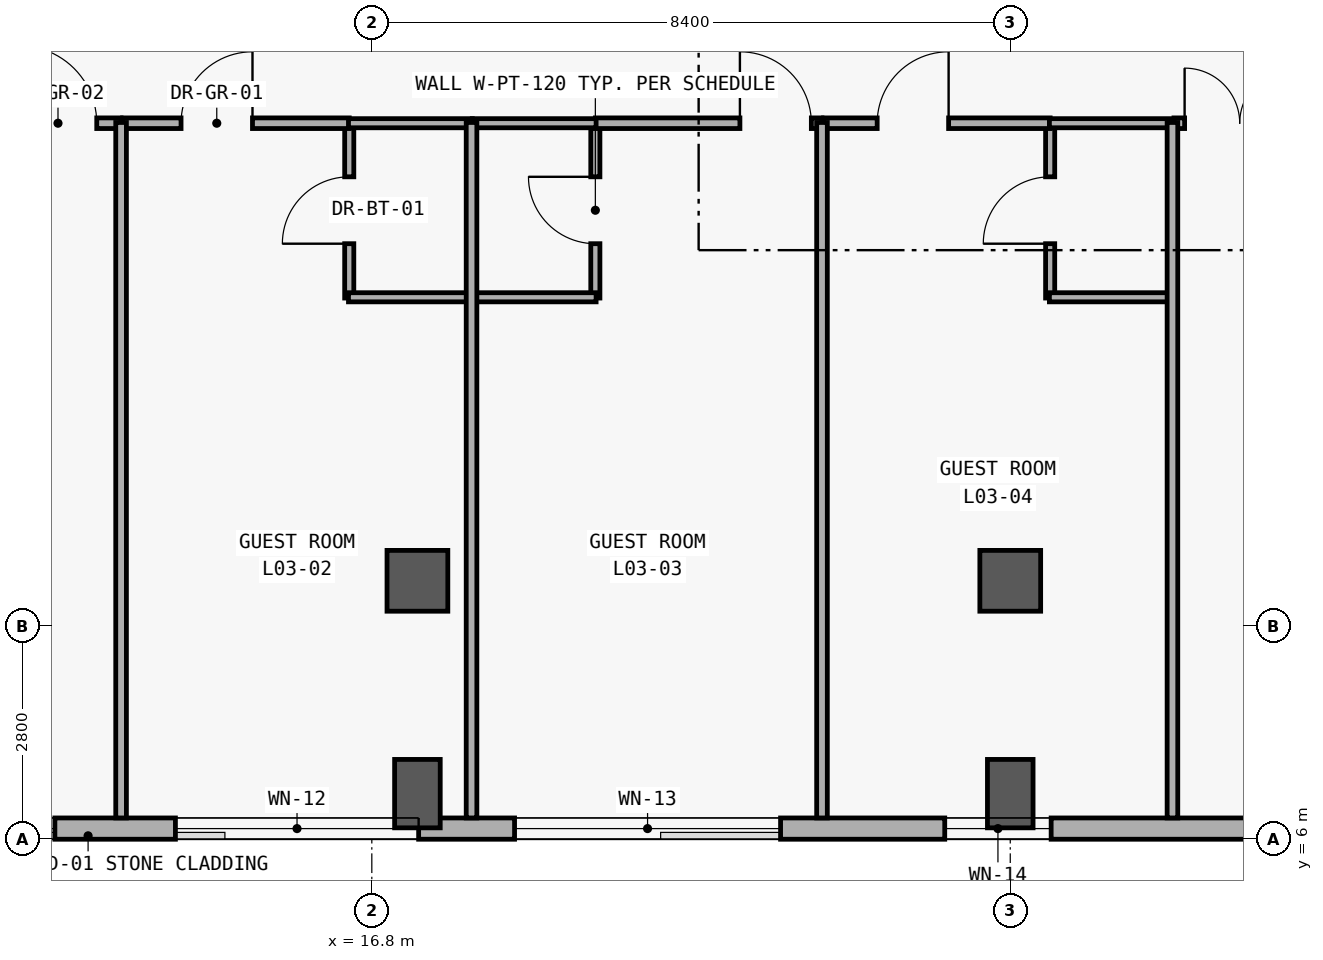
"""IFC4 building model, lengths in metres.
Left out: names, types, materials, properties, quantities, classifications, styles, units other than length and angle.
Written with IfcOpenShell. Run it as: python <this file> out.ifc"""

import sys

from ifc_helpers import new_model, si_unit, direction, frame, frame_2d, origin, origin_2d, place, context, subcontext, project, spatial, rectangle, extrude, element, fill, save


model = new_model("IFC4")
c1 = context("Model", 3, precision=1e-05, world=origin(), true_north=direction((0.0, 1.0)))
c2 = subcontext(c1, "Body", "Model", "MODEL_VIEW")
j1 = project(units=[si_unit("LENGTHUNIT", "METRE"), si_unit("PLANEANGLEUNIT", "RADIAN")], contexts=[c1])
p1 = place(None, origin())
s1 = spatial("IfcSite", under=j1, at=p1, CompositionType="ELEMENT")
p2 = place(p1, origin())
s2 = spatial("IfcBuilding", under=s1, at=p2, CompositionType="ELEMENT")
p3 = place(p2, frame((0.0, 0.0, 15.0)))
s3 = spatial("IfcBuildingStorey", under=s2, at=p3, CompositionType="ELEMENT", Elevation=15.0)
p4 = place(p3, frame((17.4, 6.6, 0.0), z_axis=(0.0, 0.0, 1.0), x_axis=(0.0, 1.0, 0.0)))
e1 = element("IfcColumn", 1, at=p4, inside=s3, PredefinedType="COLUMN", context=c2, shape_type="SweptSolid", body=[
    extrude(rectangle(XDim=0.6, YDim=0.9, at=origin_2d()), origin(), (0.0, 0.0, 1.0), 4.2),
])
p5 = place(p3, frame((17.4, 9.4, 0.0), z_axis=(0.0, 0.0, 1.0), x_axis=(1.0, 0.0, 0.0)))
e2 = element("IfcColumn", 2, at=p5, inside=s3, PredefinedType="COLUMN", context=c2, shape_type="SweptSolid", body=[
    extrude(rectangle(XDim=0.8, YDim=0.8, at=origin_2d()), origin(), (0.0, 0.0, 1.0), 4.2),
])
p6 = place(p3, frame((25.2, 6.6, 0.0), z_axis=(0.0, 0.0, 1.0), x_axis=(0.0, 1.0, 0.0)))
e3 = element("IfcColumn", 3, at=p6, inside=s3, PredefinedType="COLUMN", context=c2, shape_type="SweptSolid", body=[
    extrude(rectangle(XDim=0.6, YDim=0.9, at=origin_2d()), origin(), (0.0, 0.0, 1.0), 4.2),
])
p7 = place(p3, frame((25.2, 9.4, 0.0), z_axis=(0.0, 0.0, 1.0), x_axis=(1.0, 0.0, 0.0)))
e4 = element("IfcColumn", 4, at=p7, inside=s3, PredefinedType="COLUMN", context=c2, shape_type="SweptSolid", body=[
    extrude(rectangle(XDim=0.8, YDim=0.8, at=origin_2d()), origin(), (0.0, 0.0, 1.0), 4.2),
])
p8 = place(p3, frame((92.12, 6.14, 0.0), z_axis=(0.0, 0.0, 1.0), x_axis=(-1.0, 0.0, 0.0)))
e5 = element("IfcWall", 5, at=p8, inside=s3, PredefinedType="SOLIDWALL", context=c2, shape_type="SweptSolid", body=[
    extrude(rectangle(XDim=83.44, YDim=0.28, at=frame_2d((41.72, 0.0))), origin(), (0.0, 0.0, 1.0), 3.92),
])
p9 = place(p8, frame((79.49, 0.0, 0.85)))
e6 = element("IfcOpeningElement", 6, at=p9, cuts=e5, PredefinedType="OPENING", context=c2, shape_type="SweptSolid", body=[
    extrude(rectangle(XDim=2.85, YDim=1.85, at=frame_2d((1.425, 0.925))), frame((0.0, 0.15, 0.0), z_axis=(0.0, -1.0, 0.0), x_axis=(1.0, 0.0, 0.0)), (0.0, 0.0, 1.0), 0.3),
])
p10 = place(p8, frame((74.704, 0.0, 0.85)))
e7 = element("IfcOpeningElement", 7, at=p10, cuts=e5, PredefinedType="OPENING", context=c2, shape_type="SweptSolid", body=[
    extrude(rectangle(XDim=3.2, YDim=1.95, at=frame_2d((1.6, 0.975))), frame((0.0, 0.15, 0.0), z_axis=(0.0, -1.0, 0.0), x_axis=(1.0, 0.0, 0.0)), (0.0, 0.0, 1.0), 0.3),
])
p11 = place(p8, frame((69.942, 0.0, 0.85)))
e8 = element("IfcOpeningElement", 8, at=p11, cuts=e5, PredefinedType="OPENING", context=c2, shape_type="SweptSolid", body=[
    extrude(rectangle(XDim=3.5, YDim=2.0, at=frame_2d((1.75, 1.0))), frame((0.0, 0.15, 0.0), z_axis=(0.0, -1.0, 0.0), x_axis=(1.0, 0.0, 0.0)), (0.0, 0.0, 1.0), 0.3),
])
p12 = place(p8, frame((66.382, 0.0, 0.85)))
e9 = element("IfcOpeningElement", 9, at=p12, cuts=e5, PredefinedType="OPENING", context=c2, shape_type="SweptSolid", body=[
    extrude(rectangle(XDim=1.4, YDim=1.6, at=frame_2d((0.7, 0.8))), frame((0.0, 0.15, 0.0), z_axis=(0.0, -1.0, 0.0), x_axis=(1.0, 0.0, 0.0)), (0.0, 0.0, 1.0), 0.3),
])
p13 = place(p8, frame((61.67, 0.0, 0.85)))
e10 = element("IfcOpeningElement", 10, at=p13, cuts=e5, PredefinedType="OPENING", context=c2, shape_type="SweptSolid", body=[
    extrude(rectangle(XDim=1.6, YDim=1.6, at=frame_2d((0.8, 0.8))), frame((0.0, 0.15, 0.0), z_axis=(0.0, -1.0, 0.0), x_axis=(1.0, 0.0, 0.0)), (0.0, 0.0, 1.0), 0.3),
])
p14 = place(p8, frame((56.959, 0.0, 0.85)))
e11 = element("IfcOpeningElement", 11, at=p14, cuts=e5, PredefinedType="OPENING", context=c2, shape_type="SweptSolid", body=[
    extrude(rectangle(XDim=1.8, YDim=1.6, at=frame_2d((0.9, 0.8))), frame((0.0, 0.15, 0.0), z_axis=(0.0, -1.0, 0.0), x_axis=(1.0, 0.0, 0.0)), (0.0, 0.0, 1.0), 0.3),
])
p15 = place(p8, frame((52.248, 0.0, 0.85)))
e12 = element("IfcOpeningElement", 12, at=p15, cuts=e5, PredefinedType="OPENING", context=c2, shape_type="SweptSolid", body=[
    extrude(rectangle(XDim=2.0, YDim=1.65, at=frame_2d((1.0, 0.825))), frame((0.0, 0.15, 0.0), z_axis=(0.0, -1.0, 0.0), x_axis=(1.0, 0.0, 0.0)), (0.0, 0.0, 1.0), 0.3),
])
p16 = place(p8, frame((47.536, 0.0, 0.85)))
e13 = element("IfcOpeningElement", 13, at=p16, cuts=e5, PredefinedType="OPENING", context=c2, shape_type="SweptSolid", body=[
    extrude(rectangle(XDim=2.2, YDim=1.65, at=frame_2d((1.1, 0.825))), frame((0.0, 0.15, 0.0), z_axis=(0.0, -1.0, 0.0), x_axis=(1.0, 0.0, 0.0)), (0.0, 0.0, 1.0), 0.3),
])
p17 = place(p8, frame((42.726, 0.0, 0.85)))
e14 = element("IfcOpeningElement", 14, at=p17, cuts=e5, PredefinedType="OPENING", context=c2, shape_type="SweptSolid", body=[
    extrude(rectangle(XDim=2.6, YDim=2.2, at=frame_2d((1.3, 1.1))), frame((0.0, 0.15, 0.0), z_axis=(0.0, -1.0, 0.0), x_axis=(1.0, 0.0, 0.0)), (0.0, 0.0, 1.0), 0.3),
])
p18 = place(p8, frame((37.865, 0.0, 0.85)))
e15 = element("IfcOpeningElement", 15, at=p18, cuts=e5, PredefinedType="OPENING", context=c2, shape_type="SweptSolid", body=[
    extrude(rectangle(XDim=3.1, YDim=2.2, at=frame_2d((1.55, 1.1))), frame((0.0, 0.15, 0.0), z_axis=(0.0, -1.0, 0.0), x_axis=(1.0, 0.0, 0.0)), (0.0, 0.0, 1.0), 0.3),
])
p19 = place(p8, frame((33.004, 0.0, 0.85)))
e16 = element("IfcOpeningElement", 16, at=p19, cuts=e5, PredefinedType="OPENING", context=c2, shape_type="SweptSolid", body=[
    extrude(rectangle(XDim=3.6, YDim=2.3, at=frame_2d((1.8, 1.15))), frame((0.0, 0.15, 0.0), z_axis=(0.0, -1.0, 0.0), x_axis=(1.0, 0.0, 0.0)), (0.0, 0.0, 1.0), 0.3),
])
p20 = place(p8, frame((29.568, 0.0, 0.85)))
e17 = element("IfcOpeningElement", 17, at=p20, cuts=e5, PredefinedType="OPENING", context=c2, shape_type="SweptSolid", body=[
    extrude(rectangle(XDim=1.25, YDim=1.45, at=frame_2d((0.625, 0.725))), frame((0.0, 0.15, 0.0), z_axis=(0.0, -1.0, 0.0), x_axis=(1.0, 0.0, 0.0)), (0.0, 0.0, 1.0), 0.3),
])
p21 = place(p8, frame((24.907, 0.0, 0.85)))
e18 = element("IfcOpeningElement", 18, at=p21, cuts=e5, PredefinedType="OPENING", context=c2, shape_type="SweptSolid", body=[
    extrude(rectangle(XDim=1.35, YDim=1.55, at=frame_2d((0.675, 0.775))), frame((0.0, 0.15, 0.0), z_axis=(0.0, -1.0, 0.0), x_axis=(1.0, 0.0, 0.0)), (0.0, 0.0, 1.0), 0.3),
])
p22 = place(p8, frame((20.245, 0.0, 0.85)))
e19 = element("IfcOpeningElement", 19, at=p22, cuts=e5, PredefinedType="OPENING", context=c2, shape_type="SweptSolid", body=[
    extrude(rectangle(XDim=1.45, YDim=1.65, at=frame_2d((0.725, 0.825))), frame((0.0, 0.15, 0.0), z_axis=(0.0, -1.0, 0.0), x_axis=(1.0, 0.0, 0.0)), (0.0, 0.0, 1.0), 0.3),
])
p23 = place(p8, frame((15.584, 0.0, 0.85)))
e20 = element("IfcOpeningElement", 20, at=p23, cuts=e5, PredefinedType="OPENING", context=c2, shape_type="SweptSolid", body=[
    extrude(rectangle(XDim=1.55, YDim=1.65, at=frame_2d((0.775, 0.825))), frame((0.0, 0.15, 0.0), z_axis=(0.0, -1.0, 0.0), x_axis=(1.0, 0.0, 0.0)), (0.0, 0.0, 1.0), 0.3),
])
p24 = place(p8, frame((10.898, 0.0, 0.85)))
e21 = element("IfcOpeningElement", 21, at=p24, cuts=e5, PredefinedType="OPENING", context=c2, shape_type="SweptSolid", body=[
    extrude(rectangle(XDim=1.7, YDim=2.0, at=frame_2d((0.85, 1.0))), frame((0.0, 0.15, 0.0), z_axis=(0.0, -1.0, 0.0), x_axis=(1.0, 0.0, 0.0)), (0.0, 0.0, 1.0), 0.3),
])
p25 = place(p8, frame((5.987, 0.0, 0.85)))
e22 = element("IfcOpeningElement", 22, at=p25, cuts=e5, PredefinedType="OPENING", context=c2, shape_type="SweptSolid", body=[
    extrude(rectangle(XDim=2.3, YDim=2.05, at=frame_2d((1.15, 1.025))), frame((0.0, 0.15, 0.0), z_axis=(0.0, -1.0, 0.0), x_axis=(1.0, 0.0, 0.0)), (0.0, 0.0, 1.0), 0.3),
])
p26 = place(p8, frame((1.151, 0.0, 0.85)))
e23 = element("IfcOpeningElement", 23, at=p26, cuts=e5, PredefinedType="OPENING", context=c2, shape_type="SweptSolid", body=[
    extrude(rectangle(XDim=2.75, YDim=2.1, at=frame_2d((1.375, 1.05))), frame((0.0, 0.15, 0.0), z_axis=(0.0, -1.0, 0.0), x_axis=(1.0, 0.0, 0.0)), (0.0, 0.0, 1.0), 0.3),
])
p27 = place(p3, frame((16.503, 13.12, 0.0), z_axis=(0.0, 0.0, 1.0), x_axis=(0.0, 1.0, 0.0)))
e24 = element("IfcWall", 24, at=p27, inside=s3, PredefinedType="PARTITIONING", context=c2, shape_type="SweptSolid", body=[
    extrude(rectangle(XDim=2.31, YDim=0.12, at=frame_2d((1.155, 0.0))), origin(), (0.0, 0.0, 1.0), 3.02),
])
p28 = place(p27, frame((0.715, 0.0, 0.0)))
e25 = element("IfcOpeningElement", 25, at=p28, cuts=e24, PredefinedType="OPENING", context=c2, shape_type="SweptSolid", body=[
    extrude(rectangle(XDim=0.88, YDim=2.15, at=frame_2d((0.44, 1.075))), frame((0.0, 0.07, 0.0), z_axis=(0.0, -1.0, 0.0), x_axis=(1.0, 0.0, 0.0)), (0.0, 0.0, 1.0), 0.14),
])
p29 = place(p3, frame((19.741, 13.12, 0.0), z_axis=(0.0, 0.0, 1.0), x_axis=(0.0, 1.0, 0.0)))
e26 = element("IfcWall", 26, at=p29, inside=s3, PredefinedType="PARTITIONING", context=c2, shape_type="SweptSolid", body=[
    extrude(rectangle(XDim=2.31, YDim=0.12, at=frame_2d((1.155, 0.0))), origin(), (0.0, 0.0, 1.0), 3.02),
])
p30 = place(p29, frame((0.715, 0.0, 0.0)))
e27 = element("IfcOpeningElement", 27, at=p30, cuts=e26, PredefinedType="OPENING", context=c2, shape_type="SweptSolid", body=[
    extrude(rectangle(XDim=0.88, YDim=2.15, at=frame_2d((0.44, 1.075))), frame((0.0, 0.07, 0.0), z_axis=(0.0, -1.0, 0.0), x_axis=(1.0, 0.0, 0.0)), (0.0, 0.0, 1.0), 0.14),
])
p31 = place(p3, frame((25.725, 13.12, 0.0), z_axis=(0.0, 0.0, 1.0), x_axis=(0.0, 1.0, 0.0)))
e28 = element("IfcWall", 28, at=p31, inside=s3, PredefinedType="PARTITIONING", context=c2, shape_type="SweptSolid", body=[
    extrude(rectangle(XDim=2.31, YDim=0.12, at=frame_2d((1.155, 0.0))), origin(), (0.0, 0.0, 1.0), 3.02),
])
p32 = place(p31, frame((0.715, 0.0, 0.0)))
e29 = element("IfcOpeningElement", 29, at=p32, cuts=e28, PredefinedType="OPENING", context=c2, shape_type="SweptSolid", body=[
    extrude(rectangle(XDim=0.88, YDim=2.15, at=frame_2d((0.44, 1.075))), frame((0.0, 0.07, 0.0), z_axis=(0.0, -1.0, 0.0), x_axis=(1.0, 0.0, 0.0)), (0.0, 0.0, 1.0), 0.14),
])
p33 = place(p3, frame((10.519, 15.42, 0.0), z_axis=(0.0, 0.0, 1.0), x_axis=(1.0, 0.0, 0.0)))
e30 = element("IfcWall", 30, at=p33, inside=s3, PredefinedType="PARTITIONING", context=c2, shape_type="SweptSolid", body=[
    extrude(rectangle(XDim=2.982, YDim=0.14, at=frame_2d((1.491, 0.0))), origin(), (0.0, 0.0, 1.0), 3.02),
])
p34 = place(p33, frame((1.642, 0.0, 0.0)))
e31 = element("IfcOpeningElement", 31, at=p34, cuts=e30, PredefinedType="OPENING", context=c2, shape_type="SweptSolid", body=[
    extrude(rectangle(XDim=1.02, YDim=2.2, at=frame_2d((0.51, 1.1))), frame((0.0, 0.08, 0.0), z_axis=(0.0, -1.0, 0.0), x_axis=(1.0, 0.0, 0.0)), (0.0, 0.0, 1.0), 0.16),
])
p35 = place(p3, frame((13.521, 15.42, 0.0), z_axis=(0.0, 0.0, 1.0), x_axis=(1.0, 0.0, 0.0)))
e32 = element("IfcWall", 32, at=p35, inside=s3, PredefinedType="PARTITIONING", context=c2, shape_type="SweptSolid", body=[
    extrude(rectangle(XDim=2.982, YDim=0.14, at=frame_2d((1.491, 0.0))), origin(), (0.0, 0.0, 1.0), 3.02),
])
p36 = place(p35, frame((0.769, 0.0, 0.0)))
e33 = element("IfcOpeningElement", 33, at=p36, cuts=e32, PredefinedType="OPENING", context=c2, shape_type="SweptSolid", body=[
    extrude(rectangle(XDim=0.94, YDim=2.2, at=frame_2d((0.47, 1.1))), frame((0.0, 0.08, 0.0), z_axis=(0.0, -1.0, 0.0), x_axis=(1.0, 0.0, 0.0)), (0.0, 0.0, 1.0), 0.16),
])
p37 = place(p3, frame((19.741, 15.42, 0.0), z_axis=(0.0, 0.0, 1.0), x_axis=(1.0, 0.0, 0.0)))
e34 = element("IfcWall", 34, at=p37, inside=s3, PredefinedType="PARTITIONING", context=c2, shape_type="SweptSolid", body=[
    extrude(rectangle(XDim=2.982, YDim=0.14, at=frame_2d((1.491, 0.0))), origin(), (0.0, 0.0, 1.0), 3.02),
])
p38 = place(p37, frame((1.902, 0.0, 0.0)))
e35 = element("IfcOpeningElement", 35, at=p38, cuts=e34, PredefinedType="OPENING", context=c2, shape_type="SweptSolid", body=[
    extrude(rectangle(XDim=0.94, YDim=2.2, at=frame_2d((0.47, 1.1))), frame((0.0, 0.08, 0.0), z_axis=(0.0, -1.0, 0.0), x_axis=(1.0, 0.0, 0.0)), (0.0, 0.0, 1.0), 0.16),
])
p39 = place(p3, frame((22.743, 15.42, 0.0), z_axis=(0.0, 0.0, 1.0), x_axis=(1.0, 0.0, 0.0)))
e36 = element("IfcWall", 36, at=p39, inside=s3, PredefinedType="PARTITIONING", context=c2, shape_type="SweptSolid", body=[
    extrude(rectangle(XDim=2.982, YDim=0.14, at=frame_2d((1.491, 0.0))), origin(), (0.0, 0.0, 1.0), 3.02),
])
p40 = place(p39, frame((0.706, 0.0, 0.0)))
e37 = element("IfcOpeningElement", 37, at=p40, cuts=e36, PredefinedType="OPENING", context=c2, shape_type="SweptSolid", body=[
    extrude(rectangle(XDim=0.94, YDim=2.2, at=frame_2d((0.47, 1.1))), frame((0.0, 0.08, 0.0), z_axis=(0.0, -1.0, 0.0), x_axis=(1.0, 0.0, 0.0)), (0.0, 0.0, 1.0), 0.16),
])
p41 = place(p3, frame((27.354, 15.42, 0.0), z_axis=(0.0, 0.0, 1.0), x_axis=(1.0, 0.0, 0.0)))
e38 = element("IfcWall", 38, at=p41, inside=s3, PredefinedType="PARTITIONING", context=c2, shape_type="SweptSolid", body=[
    extrude(rectangle(XDim=2.983, YDim=0.14, at=frame_2d((1.491, 0.0))), origin(), (0.0, 0.0, 1.0), 3.02),
])
p42 = place(p41, frame((0.14, 0.0, 0.0)))
e39 = element("IfcOpeningElement", 39, at=p42, cuts=e38, PredefinedType="OPENING", context=c2, shape_type="SweptSolid", body=[
    extrude(rectangle(XDim=1.45, YDim=2.3, at=frame_2d((0.725, 1.15))), frame((0.0, 0.08, 0.0), z_axis=(0.0, -1.0, 0.0), x_axis=(1.0, 0.0, 0.0)), (0.0, 0.0, 1.0), 0.16),
])
for number, where, z_axis, x_axis in (
    (40, (16.493, 13.13, 0.0), (0.0, 0.0, 1.0), (1.0, 0.0, 0.0)),
    (41, (16.493, 15.42, 0.0), (0.0, 0.0, 1.0), (1.0, 0.0, 0.0)),
):
    element("IfcWall", number, at=place(p3, frame(where, z_axis=z_axis, x_axis=x_axis)), inside=s3, PredefinedType="PARTITIONING", context=c2, shape_type="SweptSolid", body=[
        extrude(rectangle(XDim=1.629, YDim=0.12, at=frame_2d((0.814, 0.0))), origin(), (0.0, 0.0, 1.0), 3.02),
    ])
for number, where, z_axis, x_axis in (
    (42, (18.122, 13.13, 0.0), (0.0, 0.0, 1.0), (1.0, 0.0, 0.0)),
    (43, (18.122, 15.42, 0.0), (0.0, 0.0, 1.0), (1.0, 0.0, 0.0)),
    (44, (25.715, 13.13, 0.0), (0.0, 0.0, 1.0), (1.0, 0.0, 0.0)),
    (45, (25.715, 15.42, 0.0), (0.0, 0.0, 1.0), (1.0, 0.0, 0.0)),
):
    element("IfcWall", number, at=place(p3, frame(where, z_axis=z_axis, x_axis=x_axis)), inside=s3, PredefinedType="PARTITIONING", context=c2, shape_type="SweptSolid", body=[
        extrude(rectangle(XDim=1.629, YDim=0.12, at=frame_2d((0.814, 0.0))), origin(), (0.0, 0.0, 1.0), 3.02),
    ])
for number, where, z_axis, x_axis in (
    (46, (13.501, 6.28, 0.0), (0.0, 0.0, 1.0), (0.0, 1.0, 0.0)),
    (47, (18.112, 6.28, 0.0), (0.0, 0.0, 1.0), (0.0, 1.0, 0.0)),
    (48, (22.723, 6.28, 0.0), (0.0, 0.0, 1.0), (0.0, 1.0, 0.0)),
    (49, (27.334, 6.28, 0.0), (0.0, 0.0, 1.0), (0.0, 1.0, 0.0)),
):
    element("IfcWall", number, at=place(p3, frame(where, z_axis=z_axis, x_axis=x_axis)), inside=s3, PredefinedType="PARTITIONING", context=c2, shape_type="SweptSolid", body=[
        extrude(rectangle(XDim=9.15, YDim=0.14, at=frame_2d((4.575, 0.0))), origin(), (0.0, 0.0, 1.0), 3.02),
    ])
p43 = place(p9, origin())
e50 = element("IfcWindow", 50, at=p43, inside=s3, PartitioningType="SINGLE_PANEL", PredefinedType="WINDOW", context=c2, shape_type="SweptSolid", body=[
    extrude(rectangle(XDim=2.85, YDim=1.85, at=frame_2d((1.425, 0.925))), frame((0.0, 0.03, 0.0), z_axis=(0.0, -1.0, 0.0), x_axis=(1.0, 0.0, 0.0)), (0.0, 0.0, 1.0), 0.06),
])
fill(e6, e50)
p44 = place(p10, origin())
e51 = element("IfcWindow", 51, at=p44, inside=s3, PartitioningType="SINGLE_PANEL", PredefinedType="WINDOW", context=c2, shape_type="SweptSolid", body=[
    extrude(rectangle(XDim=3.2, YDim=1.95, at=frame_2d((1.6, 0.975))), frame((0.0, 0.03, 0.0), z_axis=(0.0, -1.0, 0.0), x_axis=(1.0, 0.0, 0.0)), (0.0, 0.0, 1.0), 0.06),
])
fill(e7, e51)
p45 = place(p11, origin())
e52 = element("IfcWindow", 52, at=p45, inside=s3, PartitioningType="SINGLE_PANEL", PredefinedType="WINDOW", context=c2, shape_type="SweptSolid", body=[
    extrude(rectangle(XDim=3.5, YDim=2.0, at=frame_2d((1.75, 1.0))), frame((0.0, 0.03, 0.0), z_axis=(0.0, -1.0, 0.0), x_axis=(1.0, 0.0, 0.0)), (0.0, 0.0, 1.0), 0.06),
])
fill(e8, e52)
p46 = place(p12, origin())
e53 = element("IfcWindow", 53, at=p46, inside=s3, PartitioningType="SINGLE_PANEL", PredefinedType="WINDOW", context=c2, shape_type="SweptSolid", body=[
    extrude(rectangle(XDim=1.4, YDim=1.6, at=frame_2d((0.7, 0.8))), frame((0.0, 0.03, 0.0), z_axis=(0.0, -1.0, 0.0), x_axis=(1.0, 0.0, 0.0)), (0.0, 0.0, 1.0), 0.06),
])
fill(e9, e53)
p47 = place(p28, origin())
e54 = element("IfcDoor", 54, at=p47, inside=s3, OperationType="SINGLE_SWING_LEFT", PredefinedType="DOOR", context=c2, shape_type="SweptSolid", body=[
    extrude(rectangle(XDim=0.88, YDim=2.15, at=frame_2d((0.44, 1.075))), frame((0.0, 0.025, 0.0), z_axis=(0.0, -1.0, 0.0), x_axis=(1.0, 0.0, 0.0)), (0.0, 0.0, 1.0), 0.05),
])
fill(e25, e54)
p48 = place(p30, origin())
e55 = element("IfcDoor", 55, at=p48, inside=s3, OperationType="SINGLE_SWING_RIGHT", PredefinedType="DOOR", context=c2, shape_type="SweptSolid", body=[
    extrude(rectangle(XDim=0.88, YDim=2.15, at=frame_2d((0.44, 1.075))), frame((0.0, 0.025, 0.0), z_axis=(0.0, -1.0, 0.0), x_axis=(1.0, 0.0, 0.0)), (0.0, 0.0, 1.0), 0.05),
])
fill(e27, e55)
p49 = place(p32, origin())
e56 = element("IfcDoor", 56, at=p49, inside=s3, OperationType="SINGLE_SWING_LEFT", PredefinedType="DOOR", context=c2, shape_type="SweptSolid", body=[
    extrude(rectangle(XDim=0.88, YDim=2.15, at=frame_2d((0.44, 1.075))), frame((0.0, 0.025, 0.0), z_axis=(0.0, -1.0, 0.0), x_axis=(1.0, 0.0, 0.0)), (0.0, 0.0, 1.0), 0.05),
])
fill(e29, e56)
p50 = place(p34, origin())
e57 = element("IfcDoor", 57, at=p50, inside=s3, OperationType="SINGLE_SWING_LEFT", PredefinedType="DOOR", context=c2, shape_type="SweptSolid", body=[
    extrude(rectangle(XDim=1.02, YDim=2.2, at=frame_2d((0.51, 1.1))), frame((0.0, 0.025, 0.0), z_axis=(0.0, -1.0, 0.0), x_axis=(1.0, 0.0, 0.0)), (0.0, 0.0, 1.0), 0.05),
])
fill(e31, e57)
p51 = place(p36, origin())
e58 = element("IfcDoor", 58, at=p51, inside=s3, OperationType="SINGLE_SWING_RIGHT", PredefinedType="DOOR", context=c2, shape_type="SweptSolid", body=[
    extrude(rectangle(XDim=0.94, YDim=2.2, at=frame_2d((0.47, 1.1))), frame((0.0, 0.025, 0.0), z_axis=(0.0, -1.0, 0.0), x_axis=(1.0, 0.0, 0.0)), (0.0, 0.0, 1.0), 0.05),
])
fill(e33, e58)
p52 = place(p38, origin())
e59 = element("IfcDoor", 59, at=p52, inside=s3, OperationType="SINGLE_SWING_LEFT", PredefinedType="DOOR", context=c2, shape_type="SweptSolid", body=[
    extrude(rectangle(XDim=0.94, YDim=2.2, at=frame_2d((0.47, 1.1))), frame((0.0, 0.025, 0.0), z_axis=(0.0, -1.0, 0.0), x_axis=(1.0, 0.0, 0.0)), (0.0, 0.0, 1.0), 0.05),
])
fill(e35, e59)
p53 = place(p40, origin())
e60 = element("IfcDoor", 60, at=p53, inside=s3, OperationType="SINGLE_SWING_RIGHT", PredefinedType="DOOR", context=c2, shape_type="SweptSolid", body=[
    extrude(rectangle(XDim=0.94, YDim=2.2, at=frame_2d((0.47, 1.1))), frame((0.0, 0.025, 0.0), z_axis=(0.0, -1.0, 0.0), x_axis=(1.0, 0.0, 0.0)), (0.0, 0.0, 1.0), 0.05),
])
fill(e37, e60)
p54 = place(p42, origin())
e61 = element("IfcDoor", 61, at=p54, inside=s3, OperationType="DOUBLE_DOOR_SINGLE_SWING", PredefinedType="DOOR", context=c2, shape_type="SweptSolid", body=[
    extrude(rectangle(XDim=1.45, YDim=2.3, at=frame_2d((0.725, 1.15))), frame((0.0, 0.025, 0.0), z_axis=(0.0, -1.0, 0.0), x_axis=(1.0, 0.0, 0.0)), (0.0, 0.0, 1.0), 0.05),
])
fill(e39, e61)
save(model, sys.argv[1])
